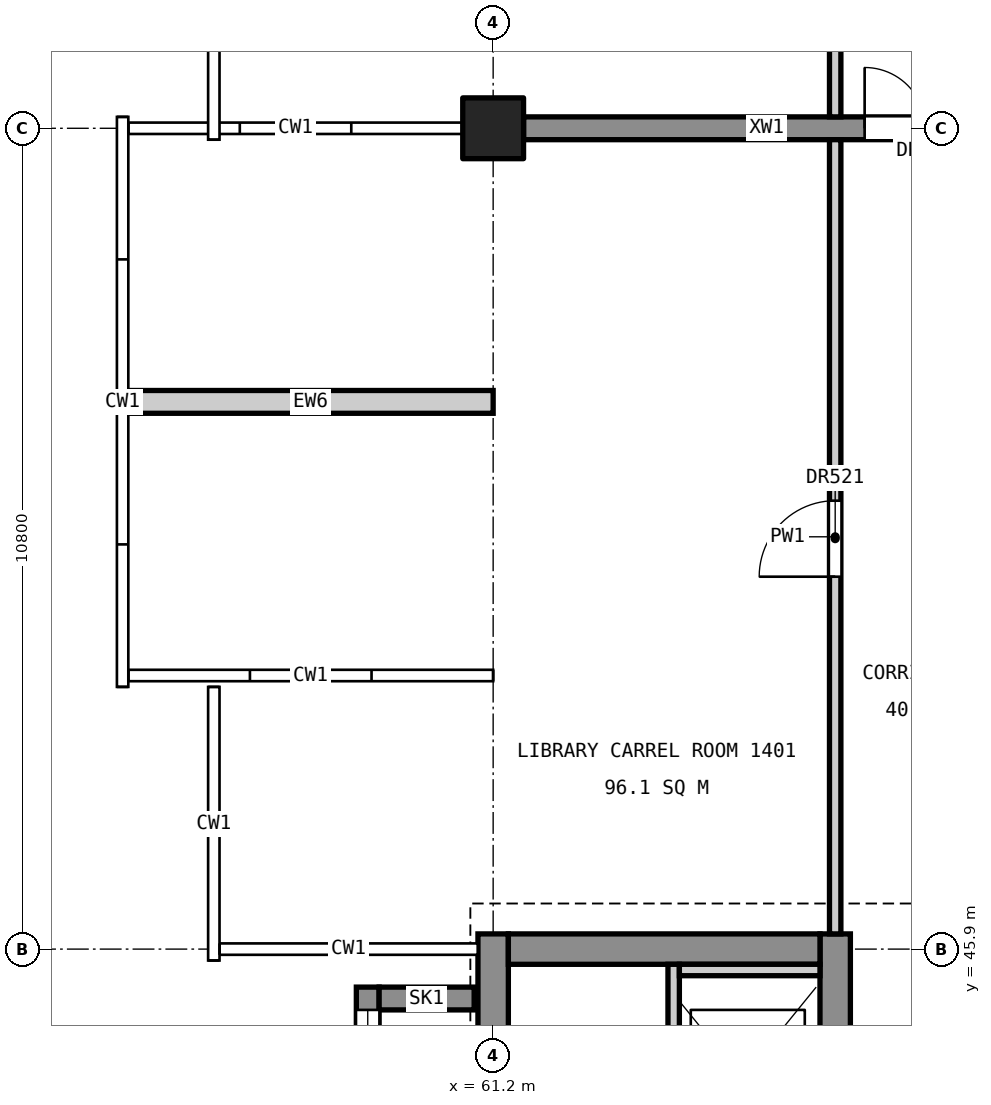
"""IFC4 building model, lengths in metres.
Left out: names, types, materials, properties, quantities, classifications, styles, units other than length and angle.
Written with IfcOpenShell. Run it as: python <this file> out.ifc"""

import sys

from ifc_helpers import new_model, si_unit, direction, frame, frame_2d, origin, origin_2d, place, context, subcontext, project, spatial, rectangle, extrude, element, fill, save


model = new_model("IFC4")
c1 = context("Model", 3, precision=1e-05, world=origin(), true_north=direction((0.0, 1.0)))
c2 = subcontext(c1, "Body", "Model", "MODEL_VIEW")
j1 = project(units=[si_unit("LENGTHUNIT", "METRE"), si_unit("PLANEANGLEUNIT", "RADIAN")], contexts=[c1])
p1 = place(None, origin())
s1 = spatial("IfcSite", under=j1, at=p1, CompositionType="ELEMENT")
p2 = place(p1, origin())
s2 = spatial("IfcBuilding", under=s1, at=p2, CompositionType="ELEMENT")
p3 = place(p2, frame((0.0, 0.0, 70.2)))
s3 = spatial("IfcBuildingStorey", under=s2, at=p3, CompositionType="ELEMENT", Elevation=70.2)
p4 = place(p3, frame((61.2, 56.7, 0.0), z_axis=(0.0, 0.0, 1.0), x_axis=(1.0, 0.0, 0.0)))
e1 = element("IfcColumn", 1, at=p4, inside=s3, PredefinedType="COLUMN", context=c2, shape_type="SweptSolid", body=[
    extrude(rectangle(XDim=0.8, YDim=0.8, at=origin_2d()), origin(), (0.0, 0.0, 1.0), 4.8),
])
p5 = place(p3, frame((61.2, 34.9, 0.0), z_axis=(0.0, 0.0, 1.0), x_axis=(0.0, 1.0, 0.0)))
e2 = element("IfcWall", 2, at=p5, inside=s3, PredefinedType="SHEAR", context=c2, shape_type="SweptSolid", body=[
    extrude(rectangle(XDim=11.2, YDim=0.4, at=frame_2d((5.6, 0.0))), origin(), (0.0, 0.0, 1.0), 4.55),
])
p6 = place(p5, frame((6.11, 0.0, 3.4)))
e3 = element("IfcOpeningElement", 3, at=p6, cuts=e2, PredefinedType="OPENING", context=c2, shape_type="SweptSolid", body=[
    extrude(rectangle(XDim=1.2, YDim=0.9, at=frame_2d((0.6, 0.45))), frame((0.0, 0.21, 0.0), z_axis=(0.0, -1.0, 0.0), x_axis=(1.0, 0.0, 0.0)), (0.0, 0.0, 1.0), 0.42),
])
p7 = place(p3, frame((65.7, 34.9, 0.0), z_axis=(0.0, 0.0, 1.0), x_axis=(0.0, 1.0, 0.0)))
e4 = element("IfcWall", 4, at=p7, inside=s3, PredefinedType="SHEAR", context=c2, shape_type="SweptSolid", body=[
    extrude(rectangle(XDim=11.2, YDim=0.4, at=frame_2d((5.6, 0.0))), origin(), (0.0, 0.0, 1.0), 4.55),
])
p8 = place(p7, frame((0.5, 0.0, 0.0)))
e5 = element("IfcOpeningElement", 5, at=p8, cuts=e4, PredefinedType="OPENING", context=c2, shape_type="SweptSolid", body=[
    extrude(rectangle(XDim=1.4, YDim=2.1, at=frame_2d((0.7, 1.05))), frame((0.0, 0.21, 0.0), z_axis=(0.0, -1.0, 0.0), x_axis=(1.0, 0.0, 0.0)), (0.0, 0.0, 1.0), 0.42),
])
p9 = place(p7, frame((8.75, 0.0, 0.0)))
e6 = element("IfcOpeningElement", 6, at=p9, cuts=e4, PredefinedType="OPENING", context=c2, shape_type="SweptSolid", body=[
    extrude(rectangle(XDim=1.1, YDim=2.1, at=frame_2d((0.55, 1.05))), frame((0.0, 0.21, 0.0), z_axis=(0.0, -1.0, 0.0), x_axis=(1.0, 0.0, 0.0)), (0.0, 0.0, 1.0), 0.42),
])
p10 = place(p3, frame((61.4, 45.9, 0.0), z_axis=(0.0, 0.0, 1.0), x_axis=(1.0, 0.0, 0.0)))
e7 = element("IfcWall", 7, at=p10, inside=s3, PredefinedType="SHEAR", context=c2, shape_type="SweptSolid", body=[
    extrude(rectangle(XDim=4.1, YDim=0.4, at=frame_2d((2.05, 0.0))), origin(), (0.0, 0.0, 1.0), 4.55),
])
p11 = place(p3, frame((59.55, 43.0, 0.0), z_axis=(0.0, 0.0, 1.0), x_axis=(0.0, 1.0, 0.0)))
e8 = element("IfcWall", 8, at=p11, inside=s3, PredefinedType="SHEAR", context=c2, shape_type="SweptSolid", body=[
    extrude(rectangle(XDim=2.4, YDim=0.3, at=frame_2d((1.2, 0.0))), origin(), (0.0, 0.0, 1.0), 4.8),
])
p12 = place(p11, frame((0.3, 0.0, 3.0)))
e9 = element("IfcOpeningElement", 9, at=p12, cuts=e8, PredefinedType="OPENING", context=c2, shape_type="SweptSolid", body=[
    extrude(rectangle(XDim=1.8, YDim=1.2, at=frame_2d((0.9, 0.6))), frame((0.0, 0.16, 0.0), z_axis=(0.0, -1.0, 0.0), x_axis=(1.0, 0.0, 0.0)), (0.0, 0.0, 1.0), 0.32),
])
p13 = place(p3, frame((60.95, 45.25, 0.0), z_axis=(0.0, 0.0, 1.0), x_axis=(-1.0, 0.0, 0.0)))
e10 = element("IfcWall", 10, at=p13, inside=s3, PredefinedType="SHEAR", context=c2, shape_type="SweptSolid", body=[
    extrude(rectangle(XDim=1.25, YDim=0.3, at=frame_2d((0.625, 0.0))), origin(), (0.0, 0.0, 1.0), 4.8),
])
p14 = place(p3, frame((61.6, 56.7, 0.0), z_axis=(0.0, 0.0, 1.0), x_axis=(1.0, 0.0, 0.0)))
e11 = element("IfcWall", 11, at=p14, inside=s3, PredefinedType="SHEAR", context=c2, shape_type="SweptSolid", body=[
    extrude(rectangle(XDim=6.4, YDim=0.3, at=frame_2d((3.2, 0.0))), origin(), (0.0, 0.0, 1.0), 4.55),
])
p15 = place(p14, frame((4.488, 0.0, 0.0)))
e12 = element("IfcOpeningElement", 12, at=p15, cuts=e11, PredefinedType="OPENING", context=c2, shape_type="SweptSolid", body=[
    extrude(rectangle(XDim=1.6, YDim=2.1, at=frame_2d((0.8, 1.05))), frame((0.0, 0.16, 0.0), z_axis=(0.0, -1.0, 0.0), x_axis=(1.0, 0.0, 0.0)), (0.0, 0.0, 1.0), 0.32),
])
p16 = place(p3, frame((63.575, 43.0, 0.0), z_axis=(0.0, 0.0, 1.0), x_axis=(0.0, 1.0, 0.0)))
e13 = element("IfcWall", 13, at=p16, inside=s3, PredefinedType="SOLIDWALL", context=c2, shape_type="SweptSolid", body=[
    extrude(rectangle(XDim=2.7, YDim=0.15, at=frame_2d((1.35, 0.0))), origin(), (0.0, 0.0, 1.0), 4.55),
])
p17 = place(p3, frame((63.65, 45.625, 0.0), z_axis=(0.0, 0.0, 1.0), x_axis=(1.0, 0.0, 0.0)))
e14 = element("IfcWall", 14, at=p17, inside=s3, PredefinedType="SOLIDWALL", context=c2, shape_type="SweptSolid", body=[
    extrude(rectangle(XDim=1.85, YDim=0.15, at=frame_2d((0.925, 0.0))), origin(), (0.0, 0.0, 1.0), 4.55),
])
p18 = place(p3, frame((56.4, 53.1, 0.0), z_axis=(0.0, 0.0, 1.0), x_axis=(1.0, 0.0, 0.0)))
e15 = element("IfcWall", 15, at=p18, inside=s3, PredefinedType="STANDARD", context=c2, shape_type="SweptSolid", body=[
    extrude(rectangle(XDim=4.8, YDim=0.3, at=frame_2d((2.4, 0.0))), origin(), (0.0, 0.0, 1.0), 3.65),
])
p19 = place(p3, frame((65.7, 46.1, 0.0), z_axis=(0.0, 0.0, 1.0), x_axis=(0.0, 1.0, 0.0)))
e16 = element("IfcWall", 16, at=p19, inside=s3, PredefinedType="PARTITIONING", context=c2, shape_type="SweptSolid", body=[
    extrude(rectangle(XDim=10.45, YDim=0.15, at=frame_2d((5.225, 0.0))), origin(), (0.0, 0.0, 1.0), 3.55),
])
p20 = place(p19, frame((4.7, 0.0, 0.0)))
e17 = element("IfcOpeningElement", 17, at=p20, cuts=e16, PredefinedType="OPENING", context=c2, shape_type="SweptSolid", body=[
    extrude(rectangle(XDim=1.0, YDim=2.1, at=frame_2d((0.5, 1.05))), frame((0.0, 0.085, 0.0), z_axis=(0.0, -1.0, 0.0), x_axis=(1.0, 0.0, 0.0)), (0.0, 0.0, 1.0), 0.17),
])
p21 = place(p3, frame((65.7, 56.85, 0.0), z_axis=(0.0, 0.0, 1.0), x_axis=(0.0, 1.0, 0.0)))
e18 = element("IfcWall", 18, at=p21, inside=s3, PredefinedType="PARTITIONING", context=c2, shape_type="SweptSolid", body=[
    extrude(rectangle(XDim=3.25, YDim=0.15, at=frame_2d((1.625, 0.0))), origin(), (0.0, 0.0, 1.0), 3.55),
])
p22 = place(p21, frame((1.15, 0.0, 0.0)))
e19 = element("IfcOpeningElement", 19, at=p22, cuts=e18, PredefinedType="OPENING", context=c2, shape_type="SweptSolid", body=[
    extrude(rectangle(XDim=1.0, YDim=2.1, at=frame_2d((0.5, 1.05))), frame((0.0, 0.085, 0.0), z_axis=(0.0, -1.0, 0.0), x_axis=(1.0, 0.0, 0.0)), (0.0, 0.0, 1.0), 0.17),
])
p23 = place(p12, origin())
e20 = element("IfcWindow", 20, at=p23, inside=s3, PartitioningType="SINGLE_PANEL", PredefinedType="WINDOW", context=c2, shape_type="SweptSolid", body=[
    extrude(rectangle(XDim=1.8, YDim=1.2, at=frame_2d((0.9, 0.6))), frame((0.0, 0.03, 0.0), z_axis=(0.0, -1.0, 0.0), x_axis=(1.0, 0.0, 0.0)), (0.0, 0.0, 1.0), 0.06),
])
fill(e9, e20)
p24 = place(p20, origin())
e21 = element("IfcDoor", 21, at=p24, inside=s3, OperationType="SINGLE_SWING_LEFT", PredefinedType="DOOR", context=c2, shape_type="SweptSolid", body=[
    extrude(rectangle(XDim=1.0, YDim=2.1, at=frame_2d((0.5, 1.05))), frame((0.0, 0.025, 0.0), z_axis=(0.0, -1.0, 0.0), x_axis=(1.0, 0.0, 0.0)), (0.0, 0.0, 1.0), 0.05),
])
fill(e17, e21)
p25 = place(p15, origin())
e22 = element("IfcDoor", 22, at=p25, inside=s3, OperationType="DOUBLE_DOOR_SINGLE_SWING", PredefinedType="DOOR", context=c2, shape_type="SweptSolid", body=[
    extrude(rectangle(XDim=1.6, YDim=2.1, at=frame_2d((0.8, 1.05))), frame((0.0, 0.025, 0.0), z_axis=(0.0, -1.0, 0.0), x_axis=(1.0, 0.0, 0.0)), (0.0, 0.0, 1.0), 0.05),
])
fill(e12, e22)
save(model, sys.argv[1])
